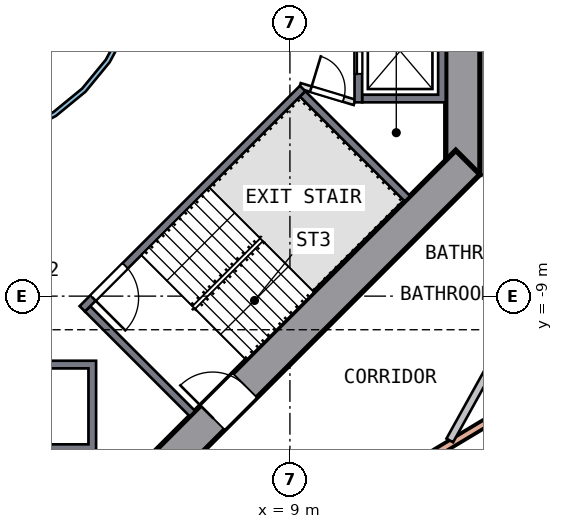
"""IFC4 building model, lengths in metres.
Left out: names, types, materials, properties, quantities, classifications, styles, units other than length and angle.
Written with IfcOpenShell. Run it as: python <this file> out.ifc"""

import sys

from ifc_helpers import new_model, si_unit, direction, frame, frame_2d, origin, place, context, subcontext, project, spatial, polyline, rectangle, outline, extrude, element, fill, save


model = new_model("IFC4")
c1 = context("Model", 3, precision=1e-05, world=origin(), true_north=direction((0.0, 1.0)))
c2 = subcontext(c1, "Body", "Model", "MODEL_VIEW")
j1 = project(units=[si_unit("LENGTHUNIT", "METRE"), si_unit("PLANEANGLEUNIT", "RADIAN")], contexts=[c1])
p1 = place(None, origin())
s1 = spatial("IfcSite", under=j1, at=p1, CompositionType="ELEMENT")
p2 = place(p1, origin())
s2 = spatial("IfcBuilding", under=s1, at=p2, CompositionType="ELEMENT")
p3 = place(p2, frame((0.0, 0.0, 39.0)))
s3 = spatial("IfcBuildingStorey", under=s2, at=p3, CompositionType="ELEMENT", Elevation=39.0)
p4 = place(p3, frame((13.55, -5.799, 0.0), z_axis=(0.0, 0.0, 1.0), x_axis=(0.0, 1.0, 0.0)))
e1 = element("IfcWall", 1, at=p4, inside=s3, PredefinedType="SHEAR", context=c2, shape_type="SweptSolid", body=[
    extrude(rectangle(XDim=11.598, YDim=0.9, at=frame_2d((5.799, 0.0))), origin(), (0.0, 0.0, 1.0), 3.5),
])
p5 = place(p4, frame((4.899, 0.0, 0.0)))
e2 = element("IfcOpeningElement", 2, at=p5, cuts=e1, PredefinedType="OPENING", context=c2, shape_type="SweptSolid", body=[
    extrude(rectangle(XDim=1.8, YDim=2.1, at=frame_2d((0.9, 1.05))), frame((0.0, 0.46, 0.0), z_axis=(0.0, -1.0, 0.0), x_axis=(1.0, 0.0, 0.0)), (0.0, 0.0, 1.0), 0.92),
])
p6 = place(p3, frame((5.481, -13.682, 0.0), z_axis=(0.0, 0.0, 1.0), x_axis=(0.707106781, 0.707106781, 0.0)))
e3 = element("IfcWall", 3, at=p6, inside=s3, PredefinedType="SHEAR", context=c2, shape_type="SweptSolid", body=[
    extrude(rectangle(XDim=11.598, YDim=0.9, at=frame_2d((5.799, 0.0))), origin(), (0.0, 0.0, 1.0), 3.5),
])
p7 = place(p6, frame((2.099, 0.0, 0.0)))
e4 = element("IfcOpeningElement", 4, at=p7, cuts=e3, PredefinedType="OPENING", context=c2, shape_type="SweptSolid", body=[
    extrude(rectangle(XDim=1.2, YDim=2.1, at=frame_2d((0.6, 1.05))), frame((0.0, 0.46, 0.0), z_axis=(0.0, -1.0, 0.0), x_axis=(1.0, 0.0, 0.0)), (0.0, 0.0, 1.0), 0.92),
])
p8 = place(p3, frame((14.761, -11.97, 0.0), z_axis=(0.0, 0.0, 1.0), x_axis=(-0.857527722, -0.514437758, 0.0)))
e5 = element("IfcWall", 5, at=p8, inside=s3, PredefinedType="SOLIDWALL", context=c2, shape_type="SweptSolid", body=[
    extrude(rectangle(XDim=13.0, YDim=0.2, at=frame_2d((6.5, 0.0))), origin(), (0.0, 0.0, 1.0), 3.19),
])
p9 = place(p8, frame((5.6, 0.0, 0.0)))
e6 = element("IfcOpeningElement", 6, at=p9, cuts=e5, PredefinedType="OPENING", context=c2, shape_type="SweptSolid", body=[
    extrude(rectangle(XDim=1.8, YDim=2.4, at=frame_2d((0.9, 1.2))), frame((0.0, 0.11, 0.0), z_axis=(0.0, -1.0, 0.0), x_axis=(1.0, 0.0, 0.0)), (0.0, 0.0, 1.0), 0.22),
])
p10 = place(p3, origin())
e7 = element("IfcWall", 7, at=p10, inside=s3, PredefinedType="SOLIDWALL", context=c2, shape_type="SweptSolid", body=[
    extrude(outline(polyline([(13.1, -3.9), (10.9, -3.9), (10.9, -3.7), (12.9, -3.7), (12.9, -1.4), (10.9, -1.4), (10.9, -1.2), (13.1, -1.2), (13.1, -3.9)])), origin(), (0.0, 0.0, 1.0), 3.19),
])
p11 = place(p3, frame((10.8, -1.2, 0.0), z_axis=(0.0, 0.0, 1.0), x_axis=(0.0, -1.0, 0.0)))
e8 = element("IfcWall", 8, at=p11, inside=s3, PredefinedType="SOLIDWALL", context=c2, shape_type="SweptSolid", body=[
    extrude(rectangle(XDim=2.7, YDim=0.2, at=frame_2d((1.35, 0.0))), origin(), (0.0, 0.0, 1.0), 3.19),
])
p12 = place(p11, frame((0.75, 0.0, 0.0)))
e9 = element("IfcOpeningElement", 9, at=p12, cuts=e8, PredefinedType="OPENING", context=c2, shape_type="SweptSolid", body=[
    extrude(rectangle(XDim=1.2, YDim=2.1, at=frame_2d((0.6, 1.05))), frame((0.0, 0.11, 0.0), z_axis=(0.0, -1.0, 0.0), x_axis=(1.0, 0.0, 0.0)), (0.0, 0.0, 1.0), 0.22),
])
p13 = place(p3, origin())
e10 = element("IfcWall", 10, at=p13, inside=s3, PredefinedType="SOLIDWALL", context=c2, shape_type="SweptSolid", body=[
    extrude(outline(polyline([(3.9, -10.7), (3.9, -13.1), (1.2, -13.1), (1.2, -10.7), (3.9, -10.7)]), holes=[polyline([(1.4, -12.9), (3.7, -12.9), (3.7, -10.9), (1.4, -10.9), (1.4, -12.9)])]), origin(), (0.0, 0.0, 1.0), 3.19),
])
p14 = place(p3, frame((9.334, -3.535, 0.0), z_axis=(0.0, 0.0, 1.0), x_axis=(-0.707106781, -0.707106781, 0.0)))
e11 = element("IfcWall", 11, at=p14, inside=s3, PredefinedType="SOLIDWALL", context=c2, shape_type="SweptSolid", body=[
    extrude(rectangle(XDim=8.2, YDim=0.2, at=frame_2d((4.1, 0.0))), origin(), (0.0, 0.0, 1.0), 3.19),
])
p15 = place(p14, frame((6.6, 0.0, 0.0)))
e12 = element("IfcOpeningElement", 12, at=p15, cuts=e11, PredefinedType="OPENING", context=c2, shape_type="SweptSolid", body=[
    extrude(rectangle(XDim=1.2, YDim=2.1, at=frame_2d((0.6, 1.05))), frame((0.0, 0.11, 0.0), z_axis=(0.0, -1.0, 0.0), x_axis=(1.0, 0.0, 0.0)), (0.0, 0.0, 1.0), 0.22),
])
for number, where, z_axis, x_axis in (
    (13, (3.677, -9.334, 0.0), (0.0, 0.0, 1.0), (0.707, -0.707, 0.0)),
    (14, (9.334, -3.677, 0.0), (0.0, 0.0, 1.0), (0.707, -0.707, 0.0)),
):
    element("IfcWall", number, at=place(p3, frame(where, z_axis=z_axis, x_axis=x_axis)), inside=s3, PredefinedType="SOLIDWALL", context=c2, shape_type="SweptSolid", body=[
        extrude(rectangle(XDim=3.9, YDim=0.2, at=frame_2d((1.95, 0.0))), origin(), (0.0, 0.0, 1.0), 3.19),
    ])
p16 = place(p3, frame((9.263, -3.465, 0.0), z_axis=(0.0, 0.0, 1.0), x_axis=(0.957084567, -0.289808785, 0.0)))
e15 = element("IfcWall", 15, at=p16, inside=s3, PredefinedType="PARTITIONING", context=c2, shape_type="SweptSolid", body=[
    extrude(rectangle(XDim=1.501, YDim=0.15, at=frame_2d((0.75, 0.0))), origin(), (0.0, 0.0, 1.0), 3.19),
])
p17 = place(p16, frame((0.301, 0.0, 0.0)))
e16 = element("IfcOpeningElement", 16, at=p17, cuts=e15, PredefinedType="OPENING", context=c2, shape_type="SweptSolid", body=[
    extrude(rectangle(XDim=0.9, YDim=2.1, at=frame_2d((0.45, 1.05))), frame((0.0, 0.085, 0.0), z_axis=(0.0, -1.0, 0.0), x_axis=(1.0, 0.0, 0.0)), (0.0, 0.0, 1.0), 0.17),
])
p18 = place(p3, origin())
e17 = element("IfcWall", 17, at=p18, inside=s3, PredefinedType="SOLIDWALL", context=c2, shape_type="SweptSolid", body=[
    extrude(outline(polyline([(5.021, -0.999), (4.73, -1.959), (4.257, -2.844), (3.62, -3.62), (2.844, -4.257), (1.959, -4.73), (0.999, -5.021), (0.0, -5.12), (-0.999, -5.021), (-1.959, -4.73), (-2.844, -4.257), (-3.62, -3.62), (-4.257, -2.844), (-4.73, -1.959), (-5.021, -0.999), (-5.12, 0.0), (-5.021, 0.999), (-4.73, 1.959), (-4.257, 2.844), (-3.62, 3.62), (-2.844, 4.257), (-1.959, 4.73), (-0.999, 5.021), (0.0, 5.12), (0.999, 5.021), (1.959, 4.73), (2.844, 4.257), (3.62, 3.62), (4.257, 2.844), (4.73, 1.959), (5.021, 0.999), (5.12, 0.0), (5.021, -0.999)]), holes=[polyline([(4.904, 0.976), (4.619, 1.913), (4.157, 2.778), (3.535, 3.535), (2.778, 4.157), (1.913, 4.619), (0.976, 4.904), (0.0, 5.0), (-0.976, 4.904), (-1.913, 4.619), (-2.778, 4.157), (-3.535, 3.535), (-4.157, 2.778), (-4.619, 1.913), (-4.904, 0.976), (-5.0, 0.0), (-4.904, -0.976), (-4.619, -1.913), (-4.157, -2.778), (-3.535, -3.535), (-2.778, -4.157), (-1.913, -4.619), (-0.976, -4.904), (0.0, -5.0), (0.976, -4.904), (1.913, -4.619), (2.778, -4.157), (3.535, -3.535), (4.157, -2.778), (4.619, -1.913), (4.904, -0.976), (5.0, 0.0), (4.904, 0.976)])]), origin(), (0.0, 0.0, 1.0), 3.19),
])
p19 = place(p3, frame((13.206, -12.798, 0.0), z_axis=(0.0, 0.0, 1.0), x_axis=(0.485400581, 0.874291871, 0.0)))
e18 = element("IfcWall", 18, at=p19, inside=s3, PredefinedType="SOLIDWALL", context=c2, shape_type="SweptSolid", body=[
    extrude(rectangle(XDim=3.678, YDim=0.2, at=frame_2d((1.839, 0.0))), origin(), (0.0, 0.0, 1.0), 3.19),
])
p20 = place(p12, origin())
e19 = element("IfcDoor", 19, at=p20, inside=s3, OperationType="DOUBLE_DOOR_SLIDING", PredefinedType="DOOR", context=c2, shape_type="SweptSolid", body=[
    extrude(rectangle(XDim=1.2, YDim=2.1, at=frame_2d((0.6, 1.05))), frame((0.0, 0.025, 0.0), z_axis=(0.0, -1.0, 0.0), x_axis=(1.0, 0.0, 0.0)), (0.0, 0.0, 1.0), 0.05),
])
fill(e9, e19)
p21 = place(p15, origin())
e20 = element("IfcDoor", 20, at=p21, inside=s3, OperationType="SINGLE_SWING_RIGHT", PredefinedType="DOOR", context=c2, shape_type="SweptSolid", body=[
    extrude(rectangle(XDim=1.2, YDim=2.1, at=frame_2d((0.6, 1.05))), frame((0.0, 0.025, 0.0), z_axis=(0.0, -1.0, 0.0), x_axis=(1.0, 0.0, 0.0)), (0.0, 0.0, 1.0), 0.05),
])
fill(e12, e20)
p22 = place(p7, origin())
e21 = element("IfcDoor", 21, at=p22, inside=s3, OperationType="SINGLE_SWING_LEFT", PredefinedType="DOOR", context=c2, shape_type="SweptSolid", body=[
    extrude(rectangle(XDim=1.2, YDim=2.1, at=frame_2d((0.6, 1.05))), frame((0.0, 0.025, 0.0), z_axis=(0.0, -1.0, 0.0), x_axis=(1.0, 0.0, 0.0)), (0.0, 0.0, 1.0), 0.05),
])
fill(e4, e21)
p23 = place(p17, origin())
e22 = element("IfcDoor", 22, at=p23, inside=s3, OperationType="SINGLE_SWING_LEFT", PredefinedType="DOOR", context=c2, shape_type="SweptSolid", body=[
    extrude(rectangle(XDim=0.9, YDim=2.1, at=frame_2d((0.45, 1.05))), frame((0.0, 0.025, 0.0), z_axis=(0.0, -1.0, 0.0), x_axis=(1.0, 0.0, 0.0)), (0.0, 0.0, 1.0), 0.05),
])
fill(e16, e22)
save(model, sys.argv[1])
